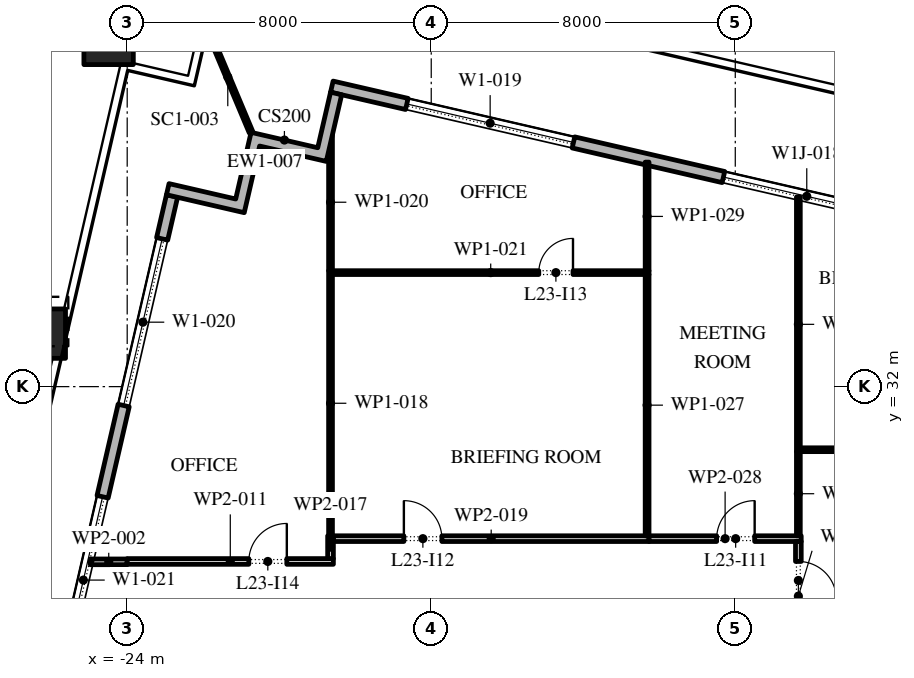
"""IFC4 building model, lengths in metres.
Left out: names, types, materials, properties, quantities, classifications, styles, units other than length and angle.
Written with IfcOpenShell. Run it as: python <this file> out.ifc"""

import sys

from ifc_helpers import new_model, si_unit, direction, frame, frame_2d, origin, origin_2d, place, context, subcontext, project, spatial, polyline, rectangle, outline, extrude, element, fill, save


model = new_model("IFC4")
c1 = context("Model", 3, precision=1e-05, world=origin(), true_north=direction((0.0, 1.0)))
c2 = subcontext(c1, "Body", "Model", "MODEL_VIEW")
j1 = project(units=[si_unit("LENGTHUNIT", "METRE"), si_unit("PLANEANGLEUNIT", "RADIAN")], contexts=[c1])
p1 = place(None, origin())
s1 = spatial("IfcSite", under=j1, at=p1, CompositionType="ELEMENT")
p2 = place(p1, origin())
s2 = spatial("IfcBuilding", under=s1, at=p2, CompositionType="ELEMENT")
p3 = place(p2, frame((0.0, 0.0, 109.8)))
s3 = spatial("IfcBuildingStorey", under=s2, at=p3, CompositionType="ELEMENT", Elevation=109.8)
p4 = place(p3, frame((-24.489, 41.124, 0.0), z_axis=(0.020319626563, 0.088225387128, 0.995893264282), x_axis=(-0.974488096918, 0.224439187676, 0.0)))
e1 = element("IfcColumn", 1, at=p4, inside=s3, PredefinedType="COLUMN", context=c2, shape_type="SweptSolid", body=[
    extrude(rectangle(XDim=1.3, YDim=1.3, at=origin_2d()), origin(), (0.0, 0.0, 1.0), 4.217),
])
p5 = place(p3, frame((-26.273, 33.394, 0.0), z_axis=(0.017444089556, 0.075687644385, 0.996978978829), x_axis=(-0.974454034257, 0.224587032398, 0.0)))
e2 = element("IfcColumn", 2, at=p5, inside=s3, PredefinedType="COLUMN", context=c2, shape_type="SweptSolid", body=[
    extrude(rectangle(XDim=1.3, YDim=1.3, at=origin_2d()), origin(), (0.0, 0.0, 1.0), 4.213),
])
p6 = place(p3, frame((31.078, 28.421, 0.0), z_axis=(0.0, 0.0, 1.0), x_axis=(-0.974370456532, 0.224949357493, 0.0)))
e3 = element("IfcWall", 3, at=p6, inside=s3, PredefinedType="STANDARD", context=c2, shape_type="SweptSolid", body=[
    extrude(rectangle(XDim=51.0, YDim=0.3, at=frame_2d((25.5, 0.0))), origin(), (0.0, 0.0, 1.0), 4.0),
])
p7 = place(p6, frame((1.875, 0.0, 0.45)))
e4 = element("IfcOpeningElement", 4, at=p7, cuts=e3, PredefinedType="OPENING", context=c2, shape_type="SweptSolid", body=[
    extrude(rectangle(XDim=4.5, YDim=3.05, at=frame_2d((2.25, 1.525))), frame((0.0, 0.16, 0.0), z_axis=(0.0, -1.0, 0.0), x_axis=(1.0, 0.0, 0.0)), (0.0, 0.0, 1.0), 0.32),
])
p8 = place(p6, frame((10.275, 0.0, 0.45)))
e5 = element("IfcOpeningElement", 5, at=p8, cuts=e3, PredefinedType="OPENING", context=c2, shape_type="SweptSolid", body=[
    extrude(rectangle(XDim=4.5, YDim=2.875, at=frame_2d((2.25, 1.438))), frame((0.0, 0.16, 0.0), z_axis=(0.0, -1.0, 0.0), x_axis=(1.0, 0.0, 0.0)), (0.0, 0.0, 1.0), 0.32),
])
p9 = place(p6, frame((18.825, 0.0, 0.45)))
e6 = element("IfcOpeningElement", 6, at=p9, cuts=e3, PredefinedType="OPENING", context=c2, shape_type="SweptSolid", body=[
    extrude(rectangle(XDim=4.5, YDim=2.875, at=frame_2d((2.25, 1.438))), frame((0.0, 0.16, 0.0), z_axis=(0.0, -1.0, 0.0), x_axis=(1.0, 0.0, 0.0)), (0.0, 0.0, 1.0), 0.32),
])
p10 = place(p6, frame((27.075, 0.0, 0.0)))
e7 = element("IfcOpeningElement", 7, at=p10, cuts=e3, PredefinedType="OPENING", context=c2, shape_type="SweptSolid", body=[
    extrude(rectangle(XDim=2.4, YDim=3.2, at=frame_2d((1.2, 1.6))), frame((0.0, 0.16, 0.0), z_axis=(0.0, -1.0, 0.0), x_axis=(1.0, 0.0, 0.0)), (0.0, 0.0, 1.0), 0.32),
])
p11 = place(p6, frame((35.925, 0.0, 0.45)))
e8 = element("IfcOpeningElement", 8, at=p11, cuts=e3, PredefinedType="OPENING", context=c2, shape_type="SweptSolid", body=[
    extrude(rectangle(XDim=4.5, YDim=2.675, at=frame_2d((2.25, 1.337))), frame((0.0, 0.16, 0.0), z_axis=(0.0, -1.0, 0.0), x_axis=(1.0, 0.0, 0.0)), (0.0, 0.0, 1.0), 0.32),
])
p12 = place(p6, frame((44.475, 0.0, 0.45)))
e9 = element("IfcOpeningElement", 9, at=p12, cuts=e3, PredefinedType="OPENING", context=c2, shape_type="SweptSolid", body=[
    extrude(rectangle(XDim=4.5, YDim=3.05, at=frame_2d((2.25, 1.525))), frame((0.0, 0.16, 0.0), z_axis=(0.0, -1.0, 0.0), x_axis=(1.0, 0.0, 0.0)), (0.0, 0.0, 1.0), 0.32),
])
p13 = place(p3, frame((-22.82, 37.016, 0.0), z_axis=(0.0, 0.0, 1.0), x_axis=(-0.224953880882, -0.974369412223, 0.0)))
e10 = element("IfcWall", 10, at=p13, inside=s3, PredefinedType="STANDARD", context=c2, shape_type="SweptSolid", body=[
    extrude(rectangle(XDim=49.5, YDim=0.3, at=frame_2d((24.75, 0.0))), origin(), (0.0, 0.0, 1.0), 4.0),
])
p14 = place(p13, frame((1.157, 0.0, 0.45)))
e11 = element("IfcOpeningElement", 11, at=p14, cuts=e10, PredefinedType="OPENING", context=c2, shape_type="SweptSolid", body=[
    extrude(rectangle(XDim=4.5, YDim=3.05, at=frame_2d((2.25, 1.525))), frame((0.0, 0.16, 0.0), z_axis=(0.0, -1.0, 0.0), x_axis=(1.0, 0.0, 0.0)), (0.0, 0.0, 1.0), 0.32),
])
p15 = place(p13, frame((8.121, 0.0, 0.45)))
e12 = element("IfcOpeningElement", 12, at=p15, cuts=e10, PredefinedType="OPENING", context=c2, shape_type="SweptSolid", body=[
    extrude(rectangle(XDim=4.5, YDim=3.05, at=frame_2d((2.25, 1.525))), frame((0.0, 0.16, 0.0), z_axis=(0.0, -1.0, 0.0), x_axis=(1.0, 0.0, 0.0)), (0.0, 0.0, 1.0), 0.32),
])
p16 = place(p13, frame((15.236, 0.0, 0.45)))
e13 = element("IfcOpeningElement", 13, at=p16, cuts=e10, PredefinedType="OPENING", context=c2, shape_type="SweptSolid", body=[
    extrude(rectangle(XDim=4.5, YDim=3.05, at=frame_2d((2.25, 1.525))), frame((0.0, 0.16, 0.0), z_axis=(0.0, -1.0, 0.0), x_axis=(1.0, 0.0, 0.0)), (0.0, 0.0, 1.0), 0.32),
])
p17 = place(p13, frame((23.4, 0.0, 0.0)))
e14 = element("IfcOpeningElement", 14, at=p17, cuts=e10, PredefinedType="OPENING", context=c2, shape_type="SweptSolid", body=[
    extrude(rectangle(XDim=2.4, YDim=3.5, at=frame_2d((1.2, 1.75))), frame((0.0, 0.16, 0.0), z_axis=(0.0, -1.0, 0.0), x_axis=(1.0, 0.0, 0.0)), (0.0, 0.0, 1.0), 0.32),
])
p18 = place(p13, frame((29.464, 0.0, 0.45)))
e15 = element("IfcOpeningElement", 15, at=p18, cuts=e10, PredefinedType="OPENING", context=c2, shape_type="SweptSolid", body=[
    extrude(rectangle(XDim=4.5, YDim=2.875, at=frame_2d((2.25, 1.438))), frame((0.0, 0.16, 0.0), z_axis=(0.0, -1.0, 0.0), x_axis=(1.0, 0.0, 0.0)), (0.0, 0.0, 1.0), 0.32),
])
p19 = place(p13, frame((36.579, 0.0, 0.45)))
e16 = element("IfcOpeningElement", 16, at=p19, cuts=e10, PredefinedType="OPENING", context=c2, shape_type="SweptSolid", body=[
    extrude(rectangle(XDim=4.5, YDim=2.675, at=frame_2d((2.25, 1.337))), frame((0.0, 0.16, 0.0), z_axis=(0.0, -1.0, 0.0), x_axis=(1.0, 0.0, 0.0)), (0.0, 0.0, 1.0), 0.32),
])
p20 = place(p13, frame((43.693, 0.0, 0.45)))
e17 = element("IfcOpeningElement", 17, at=p20, cuts=e10, PredefinedType="OPENING", context=c2, shape_type="SweptSolid", body=[
    extrude(rectangle(XDim=4.5, YDim=3.05, at=frame_2d((2.25, 1.525))), frame((0.0, 0.16, 0.0), z_axis=(0.0, -1.0, 0.0), x_axis=(1.0, 0.0, 0.0)), (0.0, 0.0, 1.0), 0.32),
])
p21 = place(p3, origin())
e18 = element("IfcWall", 18, at=p21, inside=s3, PredefinedType="STANDARD", context=c2, shape_type="SweptSolid", body=[
    extrude(outline(polyline([(-22.967, 37.049), (-22.899, 37.342), (-21.145, 36.937), (-20.74, 38.691), (-18.986, 38.286), (-18.649, 39.747), (-18.357, 39.68), (-18.762, 37.926), (-20.515, 38.331), (-20.92, 36.577), (-22.967, 37.049)])), origin(), (0.0, 0.0, 1.0), 4.0),
])
p22 = place(p3, frame((-20.74, 38.691, -0.05), z_axis=(0.0, 0.0, 1.0), x_axis=(-0.387594601634, 0.92182993268, 0.0)))
e19 = element("IfcWall", 19, at=p22, inside=s3, PredefinedType="STANDARD", context=c2, shape_type="SweptSolid", body=[
    extrude(rectangle(XDim=3.163, YDim=0.1, at=frame_2d((1.582, 0.0))), origin(), (0.0, 0.0, 1.0), 4.05),
])
p23 = place(p3, frame((-24.971, 27.39, 0.0), z_axis=(0.0, 0.0, 1.0), x_axis=(1.0, 0.0, 0.0)))
e20 = element("IfcWall", 20, at=p23, inside=s3, PredefinedType="PARTITIONING", context=c2, shape_type="SweptSolid", body=[
    extrude(rectangle(XDim=0.971, YDim=0.15, at=frame_2d((0.485, 0.0))), origin(), (0.0, 0.0, 1.0), 4.0),
])
p24 = place(p3, frame((-24.0, 27.4, 0.0), z_axis=(0.0, 0.0, 1.0), x_axis=(1.0, 0.0, 0.0)))
e21 = element("IfcWall", 21, at=p24, inside=s3, PredefinedType="PARTITIONING", context=c2, shape_type="SweptSolid", body=[
    extrude(rectangle(XDim=5.425, YDim=0.15, at=frame_2d((2.712, 0.0))), origin(), (0.0, 0.0, 1.0), 4.0),
])
p25 = place(p24, frame((3.2, 0.0, 0.0)))
e22 = element("IfcOpeningElement", 22, at=p25, cuts=e21, PredefinedType="OPENING", context=c2, shape_type="SweptSolid", body=[
    extrude(rectangle(XDim=1.0, YDim=2.1, at=frame_2d((0.5, 1.05))), frame((0.0, 0.085, 0.0), z_axis=(0.0, -1.0, 0.0), x_axis=(1.0, 0.0, 0.0)), (0.0, 0.0, 1.0), 0.17),
])
p26 = place(p3, frame((-18.65, 27.475, 0.0), z_axis=(0.0, 0.0, 1.0), x_axis=(0.0, 1.0, 0.0)))
e23 = element("IfcWall", 23, at=p26, inside=s3, PredefinedType="PARTITIONING", context=c2, shape_type="SweptSolid", body=[
    extrude(rectangle(XDim=0.6, YDim=0.15, at=frame_2d((0.3, 0.0))), origin(), (0.0, 0.0, 1.0), 4.0),
])
p27 = place(p3, frame((-18.65, 28.075, 0.0), z_axis=(0.0, 0.0, 1.0), x_axis=(0.0, 1.0, 0.0)))
e24 = element("IfcWall", 24, at=p27, inside=s3, PredefinedType="PARTITIONING", context=c2, shape_type="SweptSolid", body=[
    extrude(rectangle(XDim=6.975, YDim=0.1, at=frame_2d((3.488, 0.0))), origin(), (0.0, 0.0, 1.0), 4.0),
])
p28 = place(p3, frame((-18.575, 28.0, 0.0), z_axis=(0.0, 0.0, 1.0), x_axis=(1.0, 0.0, 0.0)))
e25 = element("IfcWall", 25, at=p28, inside=s3, PredefinedType="PARTITIONING", context=c2, shape_type="SweptSolid", body=[
    extrude(rectangle(XDim=8.305, YDim=0.15, at=frame_2d((4.152, 0.0))), origin(), (0.0, 0.0, 1.0), 4.0),
])
p29 = place(p28, frame((1.855, 0.0, 0.0)))
e26 = element("IfcOpeningElement", 26, at=p29, cuts=e25, PredefinedType="OPENING", context=c2, shape_type="SweptSolid", body=[
    extrude(rectangle(XDim=1.0, YDim=2.1, at=frame_2d((0.5, 1.05))), frame((0.0, 0.085, 0.0), z_axis=(0.0, -1.0, 0.0), x_axis=(1.0, 0.0, 0.0)), (0.0, 0.0, 1.0), 0.17),
])
p30 = place(p3, frame((-18.65, 35.05, 0.0), z_axis=(0.0, 0.0, 1.0), x_axis=(0.0, 1.0, 0.0)))
e27 = element("IfcWall", 27, at=p30, inside=s3, PredefinedType="PARTITIONING", context=c2, shape_type="SweptSolid", body=[
    extrude(rectangle(XDim=3.604, YDim=0.1, at=frame_2d((1.802, 0.0))), origin(), (0.0, 0.0, 1.0), 4.0),
])
p31 = place(p3, frame((-18.6, 35.0, 0.0), z_axis=(0.0, 0.0, 1.0), x_axis=(1.0, 0.0, 0.0)))
e28 = element("IfcWall", 28, at=p31, inside=s3, PredefinedType="PARTITIONING", context=c2, shape_type="SweptSolid", body=[
    extrude(rectangle(XDim=8.33, YDim=0.1, at=frame_2d((4.165, 0.0))), origin(), (0.0, 0.0, 1.0), 4.0),
])
p32 = place(p31, frame((5.43, 0.0, 0.0)))
e29 = element("IfcOpeningElement", 29, at=p32, cuts=e28, PredefinedType="OPENING", context=c2, shape_type="SweptSolid", body=[
    extrude(rectangle(XDim=0.9, YDim=2.1, at=frame_2d((0.45, 1.05))), frame((0.0, 0.06, 0.0), z_axis=(0.0, -1.0, 0.0), x_axis=(1.0, 0.0, 0.0)), (0.0, 0.0, 1.0), 0.12),
])
p33 = place(p3, frame((-10.32, 28.075, 0.0), z_axis=(0.0, 0.0, 1.0), x_axis=(0.0, 1.0, 0.0)))
e30 = element("IfcWall", 30, at=p33, inside=s3, PredefinedType="PARTITIONING", context=c2, shape_type="SweptSolid", body=[
    extrude(rectangle(XDim=6.875, YDim=0.1, at=frame_2d((3.438, 0.0))), origin(), (0.0, 0.0, 1.0), 4.0),
])
p34 = place(p3, frame((-10.27, 28.0, 0.0), z_axis=(0.0, 0.0, 1.0), x_axis=(1.0, 0.0, 0.0)))
e31 = element("IfcWall", 31, at=p34, inside=s3, PredefinedType="PARTITIONING", context=c2, shape_type="SweptSolid", body=[
    extrude(rectangle(XDim=4.005, YDim=0.15, at=frame_2d((2.002, 0.0))), origin(), (0.0, 0.0, 1.0), 4.0),
])
p35 = place(p34, frame((1.78, 0.0, 0.0)))
e32 = element("IfcOpeningElement", 32, at=p35, cuts=e31, PredefinedType="OPENING", context=c2, shape_type="SweptSolid", body=[
    extrude(rectangle(XDim=1.0, YDim=2.1, at=frame_2d((0.5, 1.05))), frame((0.0, 0.085, 0.0), z_axis=(0.0, -1.0, 0.0), x_axis=(1.0, 0.0, 0.0)), (0.0, 0.0, 1.0), 0.17),
])
p36 = place(p3, frame((-10.32, 35.05, 0.0), z_axis=(0.0, 0.0, 1.0), x_axis=(0.0, 1.0, 0.0)))
e33 = element("IfcWall", 33, at=p36, inside=s3, PredefinedType="PARTITIONING", context=c2, shape_type="SweptSolid", body=[
    extrude(rectangle(XDim=2.857, YDim=0.1, at=frame_2d((1.428, 0.0))), origin(), (0.0, 0.0, 1.0), 4.0),
])
p37 = place(p3, frame((-6.34, 27.925, 0.0), z_axis=(0.0, 0.0, 1.0), x_axis=(0.0, -1.0, 0.0)))
e34 = element("IfcWall", 34, at=p37, inside=s3, PredefinedType="PARTITIONING", context=c2, shape_type="SweptSolid", body=[
    extrude(rectangle(XDim=2.875, YDim=0.15, at=frame_2d((1.438, 0.0))), origin(), (0.0, 0.0, 1.0), 4.0),
])
p38 = place(p37, frame((0.525, 0.0, 0.0)))
e35 = element("IfcOpeningElement", 35, at=p38, cuts=e34, PredefinedType="OPENING", context=c2, shape_type="SweptSolid", body=[
    extrude(rectangle(XDim=1.0, YDim=2.1, at=frame_2d((0.5, 1.05))), frame((0.0, 0.085, 0.0), z_axis=(0.0, -1.0, 0.0), x_axis=(1.0, 0.0, 0.0)), (0.0, 0.0, 1.0), 0.17),
])
p39 = place(p3, frame((-6.34, 28.075, 0.0), z_axis=(0.0, 0.0, 1.0), x_axis=(0.0, 1.0, 0.0)))
e36 = element("IfcWall", 36, at=p39, inside=s3, PredefinedType="PARTITIONING", context=c2, shape_type="SweptSolid", body=[
    extrude(rectangle(XDim=2.215, YDim=0.1, at=frame_2d((1.107, 0.0))), origin(), (0.0, 0.0, 1.0), 4.0),
])
p40 = place(p3, frame((-6.34, 30.29, 0.0), z_axis=(0.0, 0.0, 1.0), x_axis=(0.0, 1.0, 0.0)))
e37 = element("IfcWall", 37, at=p40, inside=s3, PredefinedType="PARTITIONING", context=c2, shape_type="SweptSolid", body=[
    extrude(rectangle(XDim=6.698, YDim=0.1, at=frame_2d((3.349, 0.0))), origin(), (0.0, 0.0, 1.0), 4.0),
])
p41 = place(p3, frame((-6.29, 30.34, 0.0), z_axis=(0.0, 0.0, 1.0), x_axis=(1.0, 0.0, 0.0)))
e38 = element("IfcWall", 38, at=p41, inside=s3, PredefinedType="PARTITIONING", context=c2, shape_type="SweptSolid", body=[
    extrude(rectangle(XDim=8.33, YDim=0.1, at=frame_2d((4.165, 0.0))), origin(), (0.0, 0.0, 1.0), 4.0),
])
p42 = place(p41, frame((4.43, 0.0, 0.0)))
e39 = element("IfcOpeningElement", 39, at=p42, cuts=e38, PredefinedType="OPENING", context=c2, shape_type="SweptSolid", body=[
    extrude(rectangle(XDim=0.9, YDim=2.1, at=frame_2d((0.45, 1.05))), frame((0.0, 0.06, 0.0), z_axis=(0.0, -1.0, 0.0), x_axis=(1.0, 0.0, 0.0)), (0.0, 0.0, 1.0), 0.12),
])
p43 = place(p11, origin())
e40 = element("IfcWindow", 40, at=p43, inside=s3, PartitioningType="DOUBLE_PANEL_VERTICAL", PredefinedType="WINDOW", context=c2, shape_type="SweptSolid", body=[
    extrude(rectangle(XDim=4.5, YDim=2.675, at=frame_2d((2.25, 1.337))), frame((0.0, 0.03, 0.0), z_axis=(0.0, -1.0, 0.0), x_axis=(1.0, 0.0, 0.0)), (0.0, 0.0, 1.0), 0.06),
])
fill(e8, e40)
p44 = place(p12, origin())
e41 = element("IfcWindow", 41, at=p44, inside=s3, PartitioningType="DOUBLE_PANEL_VERTICAL", PredefinedType="WINDOW", context=c2, shape_type="SweptSolid", body=[
    extrude(rectangle(XDim=4.5, YDim=3.05, at=frame_2d((2.25, 1.525))), frame((0.0, 0.03, 0.0), z_axis=(0.0, -1.0, 0.0), x_axis=(1.0, 0.0, 0.0)), (0.0, 0.0, 1.0), 0.06),
])
fill(e9, e41)
p45 = place(p14, origin())
e42 = element("IfcWindow", 42, at=p45, inside=s3, PartitioningType="DOUBLE_PANEL_VERTICAL", PredefinedType="WINDOW", context=c2, shape_type="SweptSolid", body=[
    extrude(rectangle(XDim=4.5, YDim=3.05, at=frame_2d((2.25, 1.525))), frame((0.0, 0.03, 0.0), z_axis=(0.0, -1.0, 0.0), x_axis=(1.0, 0.0, 0.0)), (0.0, 0.0, 1.0), 0.06),
])
fill(e11, e42)
p46 = place(p15, origin())
e43 = element("IfcWindow", 43, at=p46, inside=s3, PartitioningType="DOUBLE_PANEL_VERTICAL", PredefinedType="WINDOW", context=c2, shape_type="SweptSolid", body=[
    extrude(rectangle(XDim=4.5, YDim=3.05, at=frame_2d((2.25, 1.525))), frame((0.0, 0.03, 0.0), z_axis=(0.0, -1.0, 0.0), x_axis=(1.0, 0.0, 0.0)), (0.0, 0.0, 1.0), 0.06),
])
fill(e12, e43)
p47 = place(p38, origin())
e44 = element("IfcDoor", 44, at=p47, inside=s3, OperationType="SINGLE_SWING_LEFT", PredefinedType="DOOR", context=c2, shape_type="SweptSolid", body=[
    extrude(rectangle(XDim=1.0, YDim=2.1, at=frame_2d((0.5, 1.05))), frame((0.0, 0.025, 0.0), z_axis=(0.0, -1.0, 0.0), x_axis=(1.0, 0.0, 0.0)), (0.0, 0.0, 1.0), 0.05),
])
fill(e35, e44)
p48 = place(p35, origin())
e45 = element("IfcDoor", 45, at=p48, inside=s3, OperationType="SINGLE_SWING_LEFT", PredefinedType="DOOR", context=c2, shape_type="SweptSolid", body=[
    extrude(rectangle(XDim=1.0, YDim=2.1, at=frame_2d((0.5, 1.05))), frame((0.0, 0.025, 0.0), z_axis=(0.0, -1.0, 0.0), x_axis=(1.0, 0.0, 0.0)), (0.0, 0.0, 1.0), 0.05),
])
fill(e32, e45)
p49 = place(p29, origin())
e46 = element("IfcDoor", 46, at=p49, inside=s3, OperationType="SINGLE_SWING_RIGHT", PredefinedType="DOOR", context=c2, shape_type="SweptSolid", body=[
    extrude(rectangle(XDim=1.0, YDim=2.1, at=frame_2d((0.5, 1.05))), frame((0.0, 0.025, 0.0), z_axis=(0.0, -1.0, 0.0), x_axis=(1.0, 0.0, 0.0)), (0.0, 0.0, 1.0), 0.05),
])
fill(e26, e46)
p50 = place(p32, origin())
e47 = element("IfcDoor", 47, at=p50, inside=s3, OperationType="SINGLE_SWING_LEFT", PredefinedType="DOOR", context=c2, shape_type="SweptSolid", body=[
    extrude(rectangle(XDim=0.9, YDim=2.1, at=frame_2d((0.45, 1.05))), frame((0.0, 0.025, 0.0), z_axis=(0.0, -1.0, 0.0), x_axis=(1.0, 0.0, 0.0)), (0.0, 0.0, 1.0), 0.05),
])
fill(e29, e47)
p51 = place(p25, origin())
e48 = element("IfcDoor", 48, at=p51, inside=s3, OperationType="SINGLE_SWING_LEFT", PredefinedType="DOOR", context=c2, shape_type="SweptSolid", body=[
    extrude(rectangle(XDim=1.0, YDim=2.1, at=frame_2d((0.5, 1.05))), frame((0.0, 0.025, 0.0), z_axis=(0.0, -1.0, 0.0), x_axis=(1.0, 0.0, 0.0)), (0.0, 0.0, 1.0), 0.05),
])
fill(e22, e48)
save(model, sys.argv[1])
